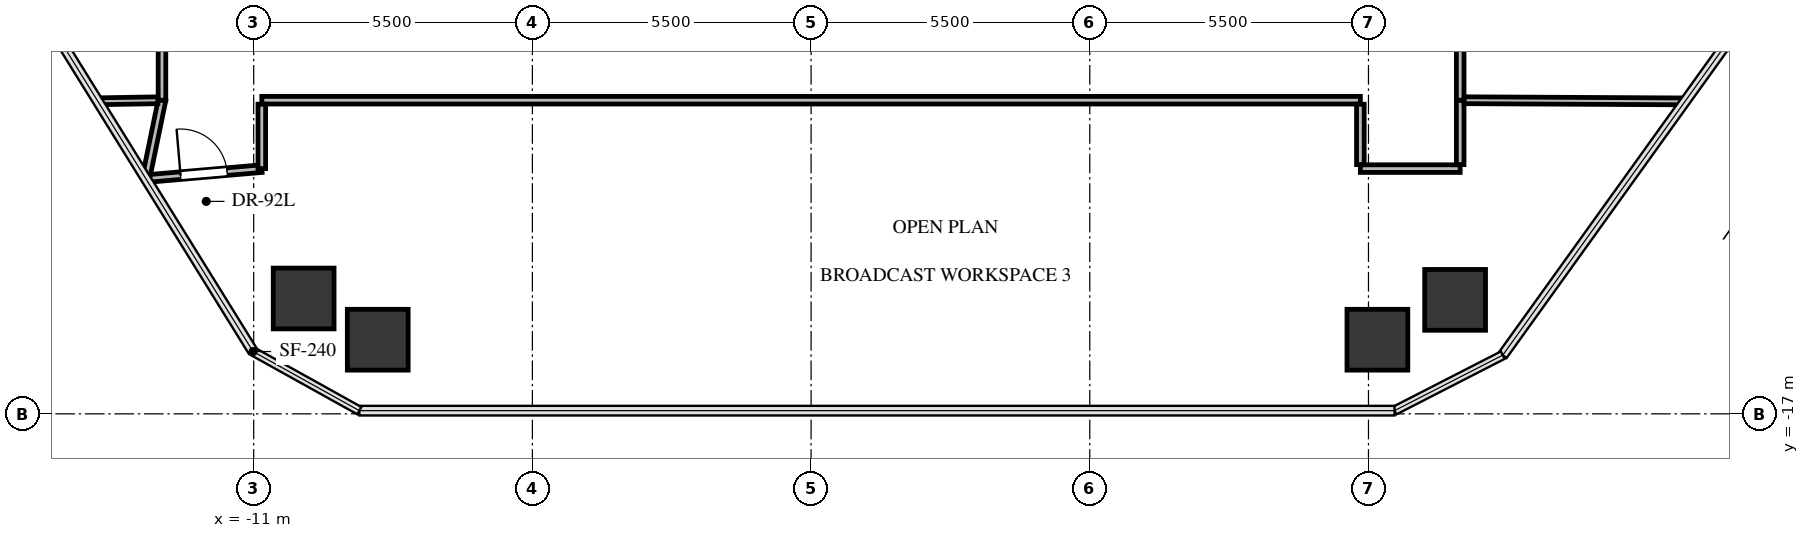
"""IFC4 building model, lengths in metres.
Left out: names, types, materials, properties, quantities, classifications, styles, units other than length and angle.
Written with IfcOpenShell. Run it as: python <this file> out.ifc"""

import sys

from ifc_helpers import new_model, si_unit, direction, frame, frame_2d, origin, origin_2d, place, context, subcontext, project, spatial, rectangle, extrude, source, transform, mapped, element, fill, save


model = new_model("IFC4")
c1 = context("Model", 3, precision=1e-05, world=origin(), true_north=direction((0.0, 1.0)))
c2 = subcontext(c1, "Body", "Model", "MODEL_VIEW")
j1 = project(units=[si_unit("LENGTHUNIT", "METRE"), si_unit("PLANEANGLEUNIT", "RADIAN")], contexts=[c1])
p1 = place(None, origin())
s1 = spatial("IfcSite", under=j1, at=p1, CompositionType="ELEMENT")
p2 = place(p1, origin())
s2 = spatial("IfcBuilding", under=s1, at=p2, CompositionType="ELEMENT")
p3 = place(p2, frame((0.0, 0.0, 104.1)))
s3 = spatial("IfcBuildingStorey", under=s2, at=p3, CompositionType="ELEMENT", Elevation=104.1)
m1 = source(origin(), c2, "Body", "SweptSolid", [
    extrude(rectangle(XDim=1.2, YDim=1.2, at=origin_2d()), origin(), (0.0, 0.0, 1.0), 3.3),
])
for number, where, z_axis, x_axis in (
    (1, (-10.014, -14.723, -0.24), (0.0, 0.0, 1.0), (1.0, 0.0, 0.0)),
    (2, (12.71, -14.75, -0.24), (0.0, 0.0, 1.0), (1.0, 0.0, 0.0)),
    (3, (11.176, -15.537, -0.24), (0.0, 0.0, 1.0), (1.0, 0.0, 0.0)),
    (4, (-8.552, -15.537, -0.24), (0.0, 0.0, 1.0), (1.0, 0.0, 0.0)),
):
    element("IfcColumn", number, at=place(p3, frame(where, z_axis=z_axis, x_axis=x_axis)), inside=s3, PredefinedType="COLUMN", context=c2, shape_type="MappedRepresentation", body=[
        mapped(m1, transform((0.0, 0.0, 0.0), x_axis=(1.0, 0.0, 0.0), y_axis=(0.0, 1.0, 0.0), z_axis=(0.0, 0.0, 1.0), scale=1.0)),
    ])
p4 = place(p3, frame((-10.84, -10.81, 0.0), z_axis=(0.0, 0.0, 1.0), x_axis=(1.0, 0.0, 0.0)))
e5 = element("IfcWall", 5, at=p4, inside=s3, PredefinedType="PARTITIONING", context=c2, shape_type="SweptSolid", body=[
    extrude(rectangle(XDim=21.68, YDim=0.15, at=frame_2d((10.84, 0.0))), origin(), (0.0, 0.0, 1.0), 2.212),
])
p5 = place(p3, frame((-13.129, -12.358, 0.0), z_axis=(0.0, 0.0, 1.0), x_axis=(0.996279168698, 0.086184789953, 0.0)))
e6 = element("IfcWall", 6, at=p5, inside=s3, PredefinedType="PARTITIONING", context=c2, shape_type="SweptSolid", body=[
    extrude(rectangle(XDim=2.297, YDim=0.15, at=frame_2d((1.149, 0.0))), origin(), (0.0, 0.0, 1.0), 2.38),
])
p6 = place(p5, frame((0.689, 0.0, 0.0)))
e7 = element("IfcOpeningElement", 7, at=p6, cuts=e6, PredefinedType="OPENING", context=c2, shape_type="SweptSolid", body=[
    extrude(rectangle(XDim=0.92, YDim=2.1, at=frame_2d((0.46, 1.05))), frame((0.0, 0.085, 0.0), z_axis=(0.0, -1.0, 0.0), x_axis=(1.0, 0.0, 0.0)), (0.0, 0.0, 1.0), 0.17),
])
p7 = place(p3, frame((10.84, -12.16, 0.0), z_axis=(0.0, 0.0, 1.0), x_axis=(1.0, 0.0, 0.0)))
e8 = element("IfcWall", 8, at=p7, inside=s3, PredefinedType="PARTITIONING", context=c2, shape_type="SweptSolid", body=[
    extrude(rectangle(XDim=1.97, YDim=0.15, at=frame_2d((0.985, 0.0))), origin(), (0.0, 0.0, 1.0), 3.045),
])
p8 = place(p3, frame((-12.81, -10.81, 0.0), z_axis=(0.0, 0.0, 1.0), x_axis=(-0.201786289638, -0.979429575474, 0.0)))
e9 = element("IfcWall", 9, at=p8, inside=s3, PredefinedType="PARTITIONING", context=c2, shape_type="SweptSolid", body=[
    extrude(rectangle(XDim=1.498, YDim=0.15, at=frame_2d((0.749, 0.0))), origin(), (0.0, 0.0, 1.0), 3.045),
])
p9 = place(p3, frame((-10.84, -12.16, 0.0), z_axis=(0.0, 0.0, 1.0), x_axis=(0.0, 1.0, 0.0)))
e10 = element("IfcWall", 10, at=p9, inside=s3, PredefinedType="PARTITIONING", context=c2, shape_type="SweptSolid", body=[
    extrude(rectangle(XDim=1.271, YDim=0.15, at=frame_2d((0.635, 0.0))), origin(), (0.0, 0.0, 1.0), 3.045),
])
p10 = place(p3, frame((10.84, -10.889, 0.0), z_axis=(0.0, 0.0, 1.0), x_axis=(0.0, -1.0, 0.0)))
e11 = element("IfcWall", 11, at=p10, inside=s3, PredefinedType="PARTITIONING", context=c2, shape_type="SweptSolid", body=[
    extrude(rectangle(XDim=1.192, YDim=0.15, at=frame_2d((0.596, 0.0))), origin(), (0.0, 0.0, 1.0), 3.045),
])
p11 = place(p3, frame((12.81, -12.081, 0.0), z_axis=(0.0, 0.0, 1.0), x_axis=(0.0, 1.0, 0.0)))
e12 = element("IfcWall", 12, at=p11, inside=s3, PredefinedType="PARTITIONING", context=c2, shape_type="SweptSolid", body=[
    extrude(rectangle(XDim=1.271, YDim=0.15, at=frame_2d((0.635, 0.0))), origin(), (0.0, 0.0, 1.0), 3.045),
])
p12 = place(p3, frame((-12.81, 10.81, 0.0), z_axis=(0.0, 0.0, 1.0), x_axis=(0.0, -1.0, 0.0)))
e13 = element("IfcWall", 13, at=p12, inside=s3, PredefinedType="PARTITIONING", context=c2, shape_type="SweptSolid", body=[
    extrude(rectangle(XDim=21.62, YDim=0.15, at=frame_2d((10.81, 0.0))), origin(), (0.0, 0.0, 1.0), 2.212),
])
p13 = place(p12, frame((10.335, 0.0, 0.0)))
e14 = element("IfcOpeningElement", 14, at=p13, cuts=e13, PredefinedType="OPENING", context=c2, shape_type="SweptSolid", body=[
    extrude(rectangle(XDim=0.95, YDim=2.1, at=frame_2d((0.475, 1.05))), frame((0.0, 0.085, 0.0), z_axis=(0.0, -1.0, 0.0), x_axis=(1.0, 0.0, 0.0)), (0.0, 0.0, 1.0), 0.17),
])
p14 = place(p3, frame((12.81, -10.81, 0.0), z_axis=(0.0, 0.0, 1.0), x_axis=(0.0, 1.0, 0.0)))
e15 = element("IfcWall", 15, at=p14, inside=s3, PredefinedType="PARTITIONING", context=c2, shape_type="SweptSolid", body=[
    extrude(rectangle(XDim=2.37, YDim=0.15, at=frame_2d((1.185, 0.0))), origin(), (0.0, 0.0, 1.0), 3.045),
])
p15 = place(p3, frame((-14.076, -10.831, 0.0), z_axis=(0.0, 0.0, 1.0), x_axis=(0.999860796611, 0.016684945308, 0.0)))
e16 = element("IfcWall", 16, at=p15, inside=s3, PredefinedType="PARTITIONING", context=c2, shape_type="SweptSolid", body=[
    extrude(rectangle(XDim=1.185, YDim=0.135, at=frame_2d((0.593, 0.0))), origin(), (0.0, 0.0, 1.0), 3.045),
])
p16 = place(p3, frame((12.889, -10.81, 0.0), z_axis=(0.0, 0.0, 1.0), x_axis=(0.999986140562, -0.005264853658, 0.0)))
e17 = element("IfcWall", 17, at=p16, inside=s3, PredefinedType="PARTITIONING", context=c2, shape_type="SweptSolid", body=[
    extrude(rectangle(XDim=4.359, YDim=0.135, at=frame_2d((2.179, 0.0))), origin(), (0.0, 0.0, 1.0), 2.38),
])
m2 = source(origin(), c2, "Body", "SweptSolid", [
    extrude(rectangle(XDim=0.92, YDim=2.1, at=frame_2d((0.46, 1.05))), frame((0.0, 0.025, 0.0), z_axis=(0.0, -1.0, 0.0), x_axis=(1.0, 0.0, 0.0)), (0.0, 0.0, 1.0), 0.05),
])
p17 = place(p6, origin())
e18 = element("IfcDoor", 18, at=p17, inside=s3, OperationType="SINGLE_SWING_LEFT", PredefinedType="DOOR", context=c2, shape_type="MappedRepresentation", body=[
    mapped(m2, transform((0.0, 0.0, 0.0), x_axis=(1.0, 0.0, 0.0), y_axis=(0.0, 1.0, 0.0), z_axis=(0.0, 0.0, 1.0), scale=1.0)),
])
fill(e7, e18)
save(model, sys.argv[1])
